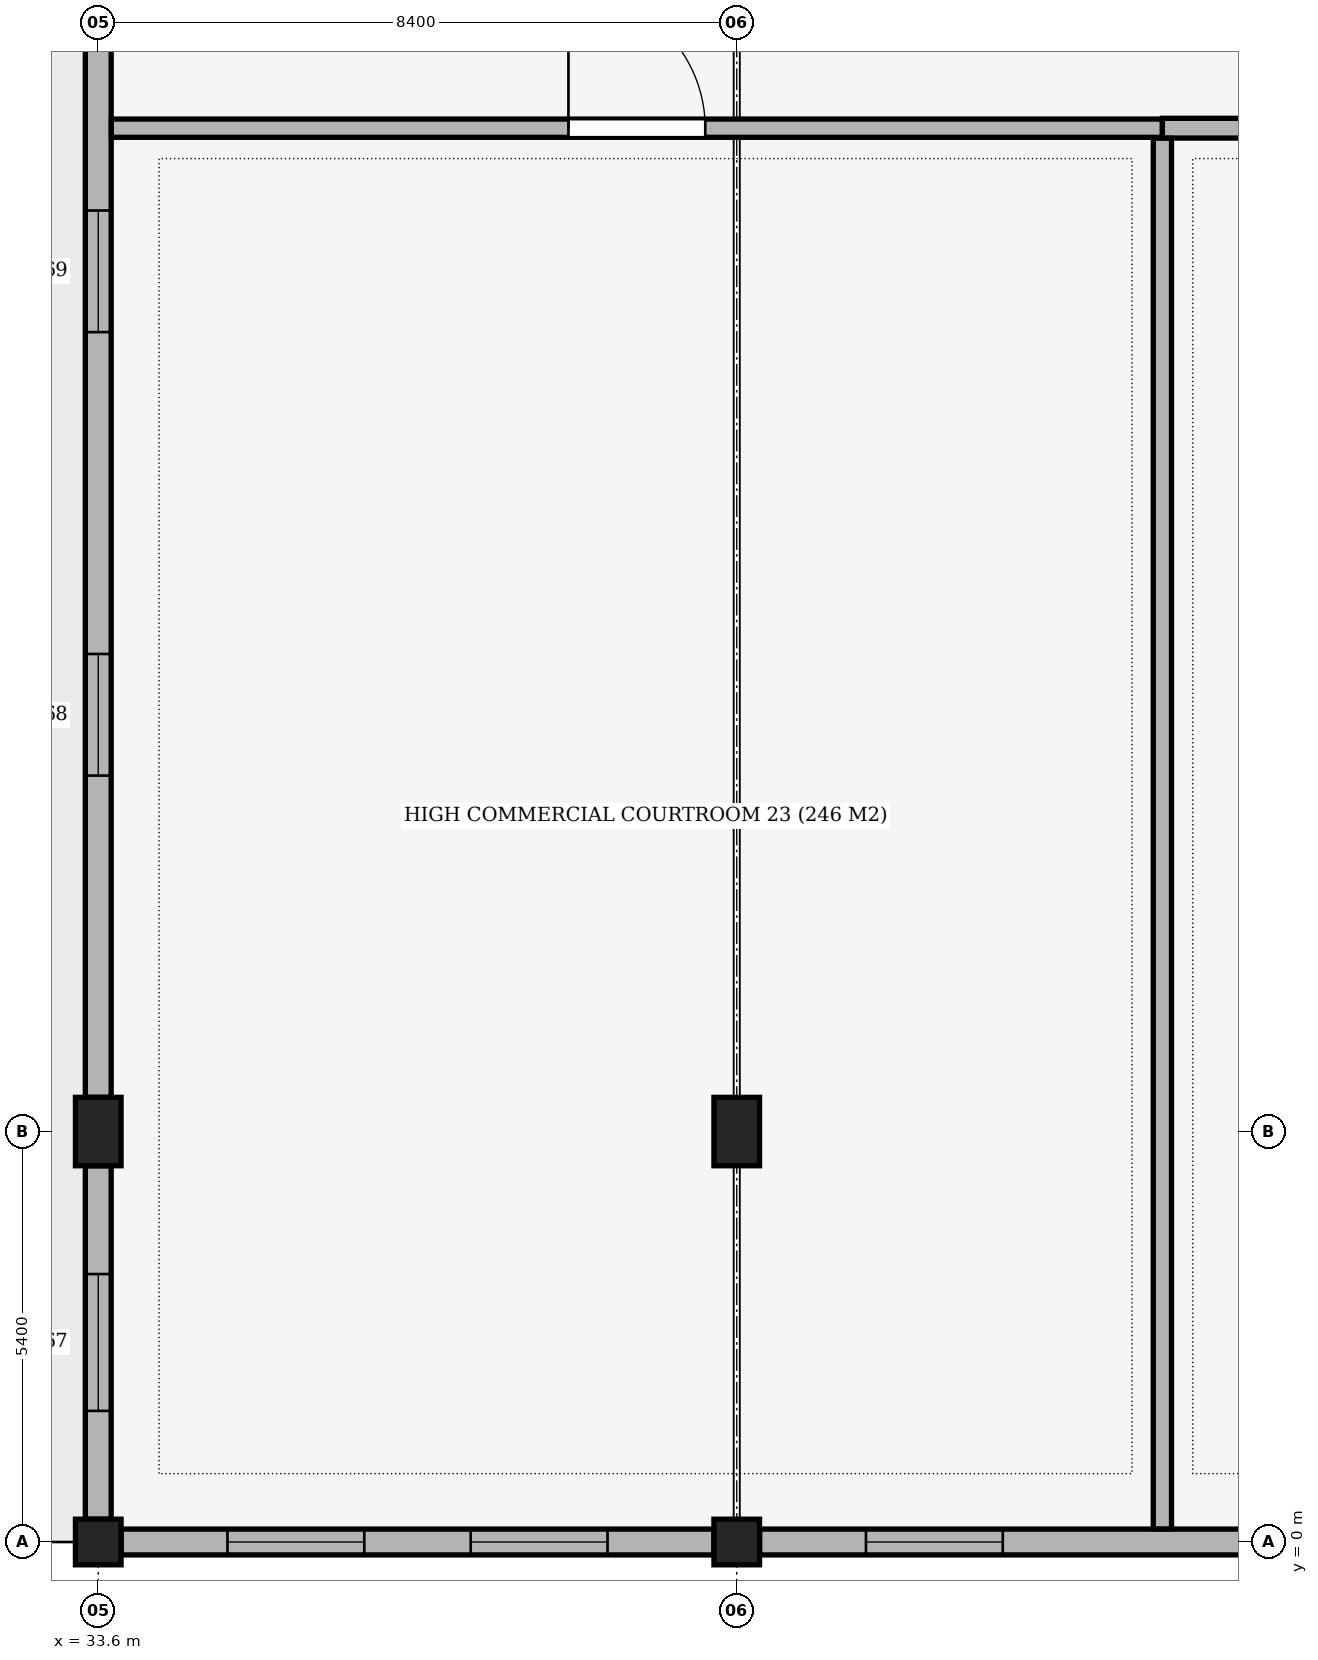
"""IFC4 building model, lengths in metres.
Left out: names, types, materials, properties, quantities, classifications, styles, units other than length and angle.
Written with IfcOpenShell. Run it as: python <this file> out.ifc"""

import sys

from ifc_helpers import new_model, si_unit, direction, frame, frame_2d, origin, origin_2d, place, context, subcontext, project, spatial, rectangle, extrude, element, fill, save


model = new_model("IFC4")
c1 = context("Model", 3, precision=1e-05, world=origin(), true_north=direction((0.0, 1.0)))
c2 = subcontext(c1, "Body", "Model", "MODEL_VIEW")
j1 = project(units=[si_unit("LENGTHUNIT", "METRE"), si_unit("PLANEANGLEUNIT", "RADIAN")], contexts=[c1])
p1 = place(None, origin())
s1 = spatial("IfcSite", under=j1, at=p1, CompositionType="ELEMENT")
p2 = place(p1, origin())
s2 = spatial("IfcBuilding", under=s1, at=p2, CompositionType="ELEMENT")
p3 = place(p2, frame((0.0, 0.0, 20.4)))
s3 = spatial("IfcBuildingStorey", under=s2, at=p3, CompositionType="ELEMENT", Elevation=20.4)
p4 = place(p3, frame((33.6, 0.0, 0.0), z_axis=(0.0, 0.0, 1.0), x_axis=(1.0, 0.0, 0.0)))
e1 = element("IfcColumn", 1, at=p4, inside=s3, PredefinedType="COLUMN", context=c2, shape_type="SweptSolid", body=[
    extrude(rectangle(XDim=0.6, YDim=0.6, at=origin_2d()), origin(), (0.0, 0.0, 1.0), 4.8),
])
p5 = place(p3, frame((33.6, 5.4, 0.0), z_axis=(0.0, 0.0, 1.0), x_axis=(1.0, 0.0, 0.0)))
e2 = element("IfcColumn", 2, at=p5, inside=s3, PredefinedType="COLUMN", context=c2, shape_type="SweptSolid", body=[
    extrude(rectangle(XDim=0.6, YDim=0.9, at=origin_2d()), origin(), (0.0, 0.0, 1.0), 4.8),
])
p6 = place(p3, frame((42.0, 0.0, 0.0), z_axis=(0.0, 0.0, 1.0), x_axis=(1.0, 0.0, 0.0)))
e3 = element("IfcColumn", 3, at=p6, inside=s3, PredefinedType="COLUMN", context=c2, shape_type="SweptSolid", body=[
    extrude(rectangle(XDim=0.6, YDim=0.6, at=origin_2d()), origin(), (0.0, 0.0, 1.0), 4.8),
])
p7 = place(p3, frame((42.0, 5.4, 0.0), z_axis=(0.0, 0.0, 1.0), x_axis=(1.0, 0.0, 0.0)))
e4 = element("IfcColumn", 4, at=p7, inside=s3, PredefinedType="COLUMN", context=c2, shape_type="SweptSolid", body=[
    extrude(rectangle(XDim=0.6, YDim=0.9, at=origin_2d()), origin(), (0.0, 0.0, 1.0), 4.8),
])
p8 = place(p3, frame((33.6, 0.3, 0.0), z_axis=(0.0, 0.0, 1.0), x_axis=(0.0, 1.0, 0.0)))
e5 = element("IfcWall", 5, at=p8, inside=s3, PredefinedType="SOLIDWALL", context=c2, shape_type="SweptSolid", body=[
    extrude(rectangle(XDim=4.65, YDim=0.34, at=frame_2d((2.325, 0.0))), origin(), (0.0, 0.0, 1.0), 4.0),
])
p9 = place(p8, frame((1.425, 0.0, 0.85)))
e6 = element("IfcOpeningElement", 6, at=p9, cuts=e5, PredefinedType="OPENING", context=c2, shape_type="SweptSolid", body=[
    extrude(rectangle(XDim=1.8, YDim=2.4, at=frame_2d((0.9, 1.2))), frame((0.0, 0.185, 0.0), z_axis=(0.0, -1.0, 0.0), x_axis=(1.0, 0.0, 0.0)), (0.0, 0.0, 1.0), 0.37),
])
p10 = place(p3, frame((33.6, 5.85, 0.0), z_axis=(0.0, 0.0, 1.0), x_axis=(0.0, 1.0, 0.0)))
e7 = element("IfcWall", 7, at=p10, inside=s3, PredefinedType="SOLIDWALL", context=c2, shape_type="SweptSolid", body=[
    extrude(rectangle(XDim=15.9, YDim=0.34, at=frame_2d((7.95, 0.0))), origin(), (0.0, 0.0, 1.0), 3.5),
])
p11 = place(p10, frame((4.233, 0.0, 1.05)))
e8 = element("IfcOpeningElement", 8, at=p11, cuts=e7, PredefinedType="OPENING", context=c2, shape_type="SweptSolid", body=[
    extrude(rectangle(XDim=1.6, YDim=1.8, at=frame_2d((0.8, 0.9))), frame((0.0, 0.185, 0.0), z_axis=(0.0, -1.0, 0.0), x_axis=(1.0, 0.0, 0.0)), (0.0, 0.0, 1.0), 0.37),
])
p12 = place(p10, frame((10.067, 0.0, 1.05)))
e9 = element("IfcOpeningElement", 9, at=p12, cuts=e7, PredefinedType="OPENING", context=c2, shape_type="SweptSolid", body=[
    extrude(rectangle(XDim=1.6, YDim=1.8, at=frame_2d((0.8, 0.9))), frame((0.0, 0.185, 0.0), z_axis=(0.0, -1.0, 0.0), x_axis=(1.0, 0.0, 0.0)), (0.0, 0.0, 1.0), 0.37),
])
p13 = place(p3, frame((50.1, 0.0, 0.0), z_axis=(0.0, 0.0, 1.0), x_axis=(-1.0, 0.0, 0.0)))
e10 = element("IfcWall", 10, at=p13, inside=s3, PredefinedType="SOLIDWALL", context=c2, shape_type="SweptSolid", body=[
    extrude(rectangle(XDim=7.8, YDim=0.34, at=frame_2d((3.9, 0.0))), origin(), (0.0, 0.0, 1.0), 3.85),
])
p14 = place(p13, frame((4.6, 0.0, 0.85)))
e11 = element("IfcOpeningElement", 11, at=p14, cuts=e10, PredefinedType="OPENING", context=c2, shape_type="SweptSolid", body=[
    extrude(rectangle(XDim=1.8, YDim=2.4, at=frame_2d((0.9, 1.2))), frame((0.0, 0.185, 0.0), z_axis=(0.0, -1.0, 0.0), x_axis=(1.0, 0.0, 0.0)), (0.0, 0.0, 1.0), 0.37),
])
p15 = place(p3, frame((41.7, 0.0, 0.0), z_axis=(0.0, 0.0, 1.0), x_axis=(-1.0, 0.0, 0.0)))
e12 = element("IfcWall", 12, at=p15, inside=s3, PredefinedType="SOLIDWALL", context=c2, shape_type="SweptSolid", body=[
    extrude(rectangle(XDim=7.8, YDim=0.34, at=frame_2d((3.9, 0.0))), origin(), (0.0, 0.0, 1.0), 3.85),
])
p16 = place(p15, frame((1.4, 0.0, 0.85)))
e13 = element("IfcOpeningElement", 13, at=p16, cuts=e12, PredefinedType="OPENING", context=c2, shape_type="SweptSolid", body=[
    extrude(rectangle(XDim=1.8, YDim=2.4, at=frame_2d((0.9, 1.2))), frame((0.0, 0.185, 0.0), z_axis=(0.0, -1.0, 0.0), x_axis=(1.0, 0.0, 0.0)), (0.0, 0.0, 1.0), 0.37),
])
p17 = place(p15, frame((4.6, 0.0, 0.85)))
e14 = element("IfcOpeningElement", 14, at=p17, cuts=e12, PredefinedType="OPENING", context=c2, shape_type="SweptSolid", body=[
    extrude(rectangle(XDim=1.8, YDim=2.4, at=frame_2d((0.9, 1.2))), frame((0.0, 0.185, 0.0), z_axis=(0.0, -1.0, 0.0), x_axis=(1.0, 0.0, 0.0)), (0.0, 0.0, 1.0), 0.37),
])
p18 = place(p3, frame((33.772, 18.6, 0.0), z_axis=(0.0, 0.0, 1.0), x_axis=(1.0, 0.0, 0.0)))
e15 = element("IfcWall", 15, at=p18, inside=s3, PredefinedType="PARTITIONING", context=c2, shape_type="SweptSolid", body=[
    extrude(rectangle(XDim=13.828, YDim=0.24, at=frame_2d((6.914, 0.0))), origin(), (0.0, 0.0, 1.0), 3.5),
])
p19 = place(p18, frame((6.014, 0.0, 0.0)))
e16 = element("IfcOpeningElement", 16, at=p19, cuts=e15, PredefinedType="OPENING", context=c2, shape_type="SweptSolid", body=[
    extrude(rectangle(XDim=1.8, YDim=2.4, at=frame_2d((0.9, 1.2))), frame((0.0, 0.135, 0.0), z_axis=(0.0, -1.0, 0.0), x_axis=(1.0, 0.0, 0.0)), (0.0, 0.0, 1.0), 0.27),
])
p20 = place(p3, frame((47.6, 18.6, 0.0), z_axis=(0.0, 0.0, 1.0), x_axis=(1.0, 0.0, 0.0)))
e17 = element("IfcWall", 17, at=p20, inside=s3, PredefinedType="PARTITIONING", context=c2, shape_type="SweptSolid", body=[
    extrude(rectangle(XDim=13.6, YDim=0.26, at=frame_2d((6.8, 0.0))), origin(), (0.0, 0.0, 1.0), 3.5),
])
p21 = place(p20, frame((5.9, 0.0, 0.0)))
e18 = element("IfcOpeningElement", 18, at=p21, cuts=e17, PredefinedType="OPENING", context=c2, shape_type="SweptSolid", body=[
    extrude(rectangle(XDim=1.8, YDim=2.4, at=frame_2d((0.9, 1.2))), frame((0.0, 0.145, 0.0), z_axis=(0.0, -1.0, 0.0), x_axis=(1.0, 0.0, 0.0)), (0.0, 0.0, 1.0), 0.29),
])
p22 = place(p3, frame((47.6, 0.172, 0.0), z_axis=(0.0, 0.0, 1.0), x_axis=(0.0, 1.0, 0.0)))
e19 = element("IfcWall", 19, at=p22, inside=s3, PredefinedType="PARTITIONING", context=c2, shape_type="SweptSolid", body=[
    extrude(rectangle(XDim=18.296, YDim=0.24, at=frame_2d((9.148, 0.0))), origin(), (0.0, 0.0, 1.0), 3.85),
])
p23 = place(p9, origin())
e20 = element("IfcWindow", 20, at=p23, inside=s3, PartitioningType="SINGLE_PANEL", PredefinedType="WINDOW", context=c2, shape_type="SweptSolid", body=[
    extrude(rectangle(XDim=1.8, YDim=2.4, at=frame_2d((0.9, 1.2))), frame((0.0, 0.03, 0.0), z_axis=(0.0, -1.0, 0.0), x_axis=(1.0, 0.0, 0.0)), (0.0, 0.0, 1.0), 0.06),
])
fill(e6, e20)
p24 = place(p11, origin())
e21 = element("IfcWindow", 21, at=p24, inside=s3, PartitioningType="SINGLE_PANEL", PredefinedType="WINDOW", context=c2, shape_type="SweptSolid", body=[
    extrude(rectangle(XDim=1.6, YDim=1.8, at=frame_2d((0.8, 0.9))), frame((0.0, 0.03, 0.0), z_axis=(0.0, -1.0, 0.0), x_axis=(1.0, 0.0, 0.0)), (0.0, 0.0, 1.0), 0.06),
])
fill(e8, e21)
p25 = place(p12, origin())
e22 = element("IfcWindow", 22, at=p25, inside=s3, PartitioningType="SINGLE_PANEL", PredefinedType="WINDOW", context=c2, shape_type="SweptSolid", body=[
    extrude(rectangle(XDim=1.6, YDim=1.8, at=frame_2d((0.8, 0.9))), frame((0.0, 0.03, 0.0), z_axis=(0.0, -1.0, 0.0), x_axis=(1.0, 0.0, 0.0)), (0.0, 0.0, 1.0), 0.06),
])
fill(e9, e22)
p26 = place(p14, origin())
e23 = element("IfcWindow", 23, at=p26, inside=s3, PartitioningType="SINGLE_PANEL", PredefinedType="WINDOW", context=c2, shape_type="SweptSolid", body=[
    extrude(rectangle(XDim=1.8, YDim=2.4, at=frame_2d((0.9, 1.2))), frame((0.0, 0.03, 0.0), z_axis=(0.0, -1.0, 0.0), x_axis=(1.0, 0.0, 0.0)), (0.0, 0.0, 1.0), 0.06),
])
fill(e11, e23)
p27 = place(p16, origin())
e24 = element("IfcWindow", 24, at=p27, inside=s3, PartitioningType="SINGLE_PANEL", PredefinedType="WINDOW", context=c2, shape_type="SweptSolid", body=[
    extrude(rectangle(XDim=1.8, YDim=2.4, at=frame_2d((0.9, 1.2))), frame((0.0, 0.03, 0.0), z_axis=(0.0, -1.0, 0.0), x_axis=(1.0, 0.0, 0.0)), (0.0, 0.0, 1.0), 0.06),
])
fill(e13, e24)
p28 = place(p17, origin())
e25 = element("IfcWindow", 25, at=p28, inside=s3, PartitioningType="SINGLE_PANEL", PredefinedType="WINDOW", context=c2, shape_type="SweptSolid", body=[
    extrude(rectangle(XDim=1.8, YDim=2.4, at=frame_2d((0.9, 1.2))), frame((0.0, 0.03, 0.0), z_axis=(0.0, -1.0, 0.0), x_axis=(1.0, 0.0, 0.0)), (0.0, 0.0, 1.0), 0.06),
])
fill(e14, e25)
p29 = place(p19, origin())
e26 = element("IfcDoor", 26, at=p29, inside=s3, OperationType="SINGLE_SWING_LEFT", PredefinedType="DOOR", context=c2, shape_type="SweptSolid", body=[
    extrude(rectangle(XDim=1.8, YDim=2.4, at=frame_2d((0.9, 1.2))), frame((0.0, 0.025, 0.0), z_axis=(0.0, -1.0, 0.0), x_axis=(1.0, 0.0, 0.0)), (0.0, 0.0, 1.0), 0.05),
])
fill(e16, e26)
save(model, sys.argv[1])
